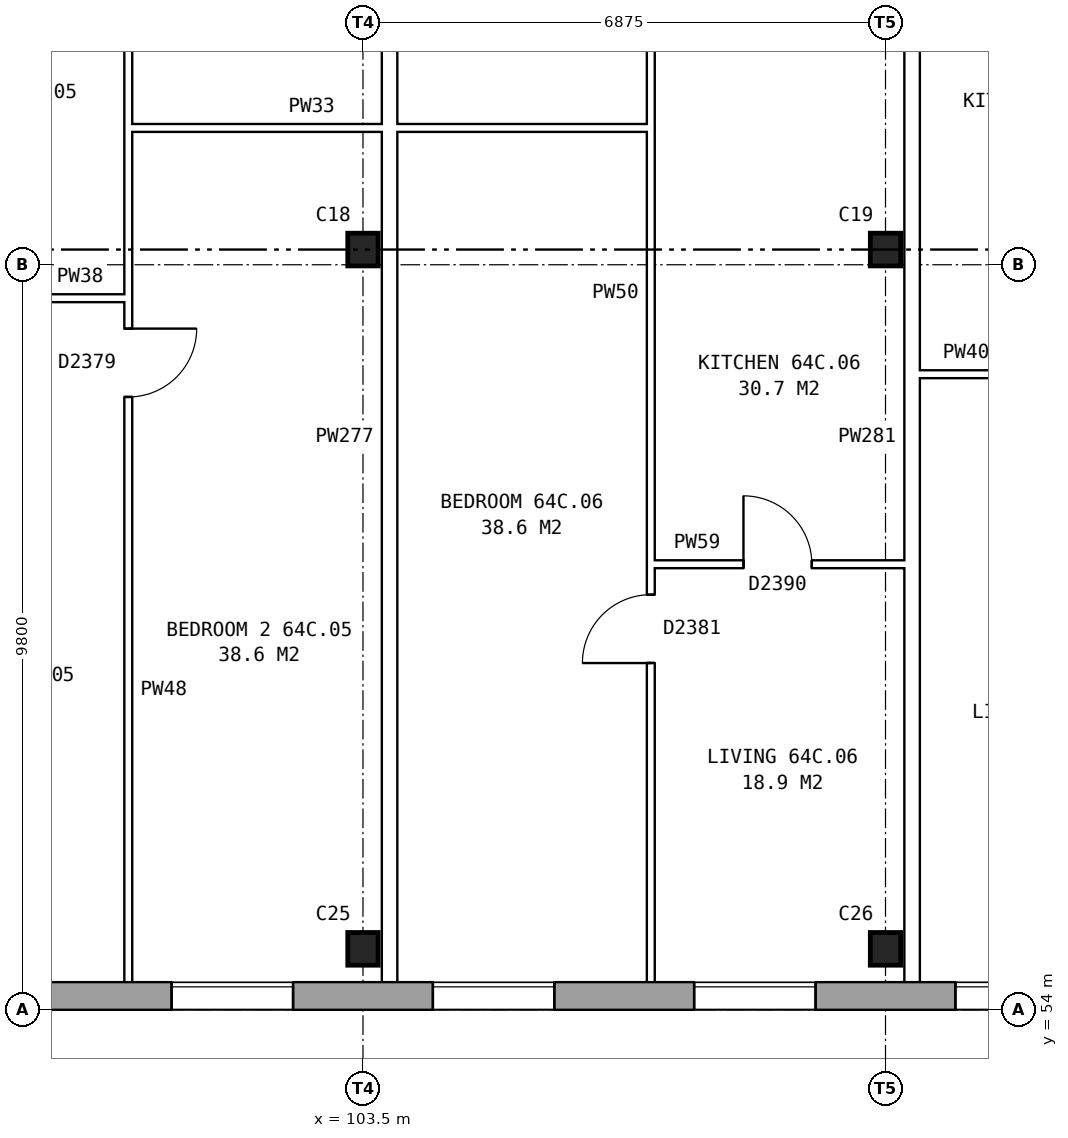
"""IFC4 building model, lengths in metres.
Left out: names, types, materials, properties, quantities, classifications, styles, units other than length and angle.
Written with IfcOpenShell. Run it as: python <this file> out.ifc"""

import sys

from ifc_helpers import new_model, si_unit, direction, frame, frame_2d, origin, origin_2d, place, context, subcontext, project, spatial, rectangle, i_section, extrude, element, fill, save


model = new_model("IFC4")
c1 = context("Model", 3, precision=1e-05, world=origin(), true_north=direction((0.0, 1.0)))
c2 = subcontext(c1, "Body", "Model", "MODEL_VIEW")
j1 = project(units=[si_unit("LENGTHUNIT", "METRE"), si_unit("PLANEANGLEUNIT", "RADIAN")], contexts=[c1])
p1 = place(None, origin())
s1 = spatial("IfcSite", under=j1, at=p1, CompositionType="ELEMENT")
p2 = place(p1, origin())
s2 = spatial("IfcBuilding", under=s1, at=p2, CompositionType="ELEMENT")
p3 = place(p2, frame((0.0, 0.0, 227.6)))
s3 = spatial("IfcBuildingStorey", under=s2, at=p3, CompositionType="ELEMENT", Elevation=227.6)
for number, where, z_axis, x_axis in (
    (1, (103.5, 54.8, 0.0), (0.0, 0.0, 1.0), (1.0, 0.0, 0.0)),
    (2, (110.375, 54.8, 0.0), (0.0, 0.0, 1.0), (1.0, 0.0, 0.0)),
    (3, (103.5, 64.0, 0.0), (0.0, 0.0, 1.0), (1.0, 0.0, 0.0)),
    (4, (110.375, 64.0, 0.0), (0.0, 0.0, 1.0), (1.0, 0.0, 0.0)),
):
    element("IfcColumn", number, at=place(p3, frame(where, z_axis=z_axis, x_axis=x_axis)), inside=s3, PredefinedType="COLUMN", context=c2, shape_type="SweptSolid", body=[
        extrude(i_section(OverallWidth=0.4, OverallDepth=0.43, WebThickness=0.04, FlangeThickness=0.04, at=origin_2d()), origin(), (0.0, 0.0, 1.0), 2.85),
    ])
p4 = place(p3, frame((75.95, 54.18, 0.0), z_axis=(0.0, 0.0, 1.0), x_axis=(1.0, 0.0, 0.0)))
e5 = element("IfcWall", 5, at=p4, inside=s3, PredefinedType="STANDARD", context=c2, shape_type="SweptSolid", body=[
    extrude(rectangle(XDim=55.1, YDim=0.36, at=frame_2d((27.55, 0.0))), origin(), (0.0, 0.0, 1.0), 2.85),
])
p5 = place(p4, frame((0.969, 0.0, 0.8)))
e6 = element("IfcOpeningElement", 6, at=p5, cuts=e5, PredefinedType="OPENING", context=c2, shape_type="SweptSolid", body=[
    extrude(rectangle(XDim=1.6, YDim=1.8, at=frame_2d((0.8, 0.9))), frame((0.0, 0.19, 0.0), z_axis=(0.0, -1.0, 0.0), x_axis=(1.0, 0.0, 0.0)), (0.0, 0.0, 1.0), 0.38),
])
p6 = place(p4, frame((4.406, 0.0, 0.8)))
e7 = element("IfcOpeningElement", 7, at=p6, cuts=e5, PredefinedType="OPENING", context=c2, shape_type="SweptSolid", body=[
    extrude(rectangle(XDim=1.6, YDim=1.8, at=frame_2d((0.8, 0.9))), frame((0.0, 0.19, 0.0), z_axis=(0.0, -1.0, 0.0), x_axis=(1.0, 0.0, 0.0)), (0.0, 0.0, 1.0), 0.38),
])
p7 = place(p4, frame((7.844, 0.0, 0.8)))
e8 = element("IfcOpeningElement", 8, at=p7, cuts=e5, PredefinedType="OPENING", context=c2, shape_type="SweptSolid", body=[
    extrude(rectangle(XDim=1.6, YDim=1.8, at=frame_2d((0.8, 0.9))), frame((0.0, 0.19, 0.0), z_axis=(0.0, -1.0, 0.0), x_axis=(1.0, 0.0, 0.0)), (0.0, 0.0, 1.0), 0.38),
])
p8 = place(p4, frame((11.281, 0.0, 0.8)))
e9 = element("IfcOpeningElement", 9, at=p8, cuts=e5, PredefinedType="OPENING", context=c2, shape_type="SweptSolid", body=[
    extrude(rectangle(XDim=1.6, YDim=1.8, at=frame_2d((0.8, 0.9))), frame((0.0, 0.19, 0.0), z_axis=(0.0, -1.0, 0.0), x_axis=(1.0, 0.0, 0.0)), (0.0, 0.0, 1.0), 0.38),
])
p9 = place(p4, frame((14.719, 0.0, 0.8)))
e10 = element("IfcOpeningElement", 10, at=p9, cuts=e5, PredefinedType="OPENING", context=c2, shape_type="SweptSolid", body=[
    extrude(rectangle(XDim=1.6, YDim=1.8, at=frame_2d((0.8, 0.9))), frame((0.0, 0.19, 0.0), z_axis=(0.0, -1.0, 0.0), x_axis=(1.0, 0.0, 0.0)), (0.0, 0.0, 1.0), 0.38),
])
p10 = place(p4, frame((18.156, 0.0, 0.8)))
e11 = element("IfcOpeningElement", 11, at=p10, cuts=e5, PredefinedType="OPENING", context=c2, shape_type="SweptSolid", body=[
    extrude(rectangle(XDim=1.6, YDim=1.8, at=frame_2d((0.8, 0.9))), frame((0.0, 0.19, 0.0), z_axis=(0.0, -1.0, 0.0), x_axis=(1.0, 0.0, 0.0)), (0.0, 0.0, 1.0), 0.38),
])
p11 = place(p4, frame((21.594, 0.0, 0.8)))
e12 = element("IfcOpeningElement", 12, at=p11, cuts=e5, PredefinedType="OPENING", context=c2, shape_type="SweptSolid", body=[
    extrude(rectangle(XDim=1.6, YDim=1.8, at=frame_2d((0.8, 0.9))), frame((0.0, 0.19, 0.0), z_axis=(0.0, -1.0, 0.0), x_axis=(1.0, 0.0, 0.0)), (0.0, 0.0, 1.0), 0.38),
])
p12 = place(p4, frame((25.031, 0.0, 0.8)))
e13 = element("IfcOpeningElement", 13, at=p12, cuts=e5, PredefinedType="OPENING", context=c2, shape_type="SweptSolid", body=[
    extrude(rectangle(XDim=1.6, YDim=1.8, at=frame_2d((0.8, 0.9))), frame((0.0, 0.19, 0.0), z_axis=(0.0, -1.0, 0.0), x_axis=(1.0, 0.0, 0.0)), (0.0, 0.0, 1.0), 0.38),
])
p13 = place(p4, frame((28.469, 0.0, 0.8)))
e14 = element("IfcOpeningElement", 14, at=p13, cuts=e5, PredefinedType="OPENING", context=c2, shape_type="SweptSolid", body=[
    extrude(rectangle(XDim=1.6, YDim=1.8, at=frame_2d((0.8, 0.9))), frame((0.0, 0.19, 0.0), z_axis=(0.0, -1.0, 0.0), x_axis=(1.0, 0.0, 0.0)), (0.0, 0.0, 1.0), 0.38),
])
p14 = place(p4, frame((31.906, 0.0, 0.8)))
e15 = element("IfcOpeningElement", 15, at=p14, cuts=e5, PredefinedType="OPENING", context=c2, shape_type="SweptSolid", body=[
    extrude(rectangle(XDim=1.6, YDim=1.8, at=frame_2d((0.8, 0.9))), frame((0.0, 0.19, 0.0), z_axis=(0.0, -1.0, 0.0), x_axis=(1.0, 0.0, 0.0)), (0.0, 0.0, 1.0), 0.38),
])
p15 = place(p4, frame((35.344, 0.0, 0.8)))
e16 = element("IfcOpeningElement", 16, at=p15, cuts=e5, PredefinedType="OPENING", context=c2, shape_type="SweptSolid", body=[
    extrude(rectangle(XDim=1.6, YDim=1.8, at=frame_2d((0.8, 0.9))), frame((0.0, 0.19, 0.0), z_axis=(0.0, -1.0, 0.0), x_axis=(1.0, 0.0, 0.0)), (0.0, 0.0, 1.0), 0.38),
])
p16 = place(p4, frame((38.781, 0.0, 0.8)))
e17 = element("IfcOpeningElement", 17, at=p16, cuts=e5, PredefinedType="OPENING", context=c2, shape_type="SweptSolid", body=[
    extrude(rectangle(XDim=1.6, YDim=1.8, at=frame_2d((0.8, 0.9))), frame((0.0, 0.19, 0.0), z_axis=(0.0, -1.0, 0.0), x_axis=(1.0, 0.0, 0.0)), (0.0, 0.0, 1.0), 0.38),
])
p17 = place(p4, frame((42.219, 0.0, 0.8)))
e18 = element("IfcOpeningElement", 18, at=p17, cuts=e5, PredefinedType="OPENING", context=c2, shape_type="SweptSolid", body=[
    extrude(rectangle(XDim=1.6, YDim=1.8, at=frame_2d((0.8, 0.9))), frame((0.0, 0.19, 0.0), z_axis=(0.0, -1.0, 0.0), x_axis=(1.0, 0.0, 0.0)), (0.0, 0.0, 1.0), 0.38),
])
p18 = place(p4, frame((45.656, 0.0, 0.8)))
e19 = element("IfcOpeningElement", 19, at=p18, cuts=e5, PredefinedType="OPENING", context=c2, shape_type="SweptSolid", body=[
    extrude(rectangle(XDim=1.6, YDim=1.8, at=frame_2d((0.8, 0.9))), frame((0.0, 0.19, 0.0), z_axis=(0.0, -1.0, 0.0), x_axis=(1.0, 0.0, 0.0)), (0.0, 0.0, 1.0), 0.38),
])
p19 = place(p4, frame((49.094, 0.0, 0.8)))
e20 = element("IfcOpeningElement", 20, at=p19, cuts=e5, PredefinedType="OPENING", context=c2, shape_type="SweptSolid", body=[
    extrude(rectangle(XDim=1.6, YDim=1.8, at=frame_2d((0.8, 0.9))), frame((0.0, 0.19, 0.0), z_axis=(0.0, -1.0, 0.0), x_axis=(1.0, 0.0, 0.0)), (0.0, 0.0, 1.0), 0.38),
])
p20 = place(p4, frame((52.531, 0.0, 0.8)))
e21 = element("IfcOpeningElement", 21, at=p20, cuts=e5, PredefinedType="OPENING", context=c2, shape_type="SweptSolid", body=[
    extrude(rectangle(XDim=1.6, YDim=1.8, at=frame_2d((0.8, 0.9))), frame((0.0, 0.19, 0.0), z_axis=(0.0, -1.0, 0.0), x_axis=(1.0, 0.0, 0.0)), (0.0, 0.0, 1.0), 0.38),
])
p21 = place(p3, frame((107.287, 59.86, 0.0), z_axis=(0.0, 0.0, 1.0), x_axis=(1.0, 0.0, 0.0)))
e22 = element("IfcWall", 22, at=p21, inside=s3, PredefinedType="PARTITIONING", context=c2, shape_type="SweptSolid", body=[
    extrude(rectangle(XDim=3.338, YDim=0.1, at=frame_2d((1.669, 0.0))), origin(), (0.0, 0.0, 1.0), 2.85),
])
p22 = place(p21, frame((1.219, 0.0, 0.0)))
e23 = element("IfcOpeningElement", 23, at=p22, cuts=e22, PredefinedType="OPENING", context=c2, shape_type="SweptSolid", body=[
    extrude(rectangle(XDim=0.9, YDim=2.1, at=frame_2d((0.45, 1.05))), frame((0.0, 0.06, 0.0), z_axis=(0.0, -1.0, 0.0), x_axis=(1.0, 0.0, 0.0)), (0.0, 0.0, 1.0), 0.12),
])
p23 = place(p3, frame((110.825, 62.36, 0.0), z_axis=(0.0, 0.0, 1.0), x_axis=(1.0, 0.0, 0.0)))
e24 = element("IfcWall", 24, at=p23, inside=s3, PredefinedType="PARTITIONING", context=c2, shape_type="SweptSolid", body=[
    extrude(rectangle(XDim=3.337, YDim=0.1, at=frame_2d((1.668, 0.0))), origin(), (0.0, 0.0, 1.0), 2.85),
])
p24 = place(p23, frame((1.219, 0.0, 0.0)))
e25 = element("IfcOpeningElement", 25, at=p24, cuts=e24, PredefinedType="OPENING", context=c2, shape_type="SweptSolid", body=[
    extrude(rectangle(XDim=0.9, YDim=2.1, at=frame_2d((0.45, 1.05))), frame((0.0, 0.06, 0.0), z_axis=(0.0, -1.0, 0.0), x_axis=(1.0, 0.0, 0.0)), (0.0, 0.0, 1.0), 0.12),
])
p25 = place(p3, frame((96.975, 63.36, 0.0), z_axis=(0.0, 0.0, 1.0), x_axis=(1.0, 0.0, 0.0)))
e26 = element("IfcWall", 26, at=p25, inside=s3, PredefinedType="PARTITIONING", context=c2, shape_type="SweptSolid", body=[
    extrude(rectangle(XDim=3.437, YDim=0.1, at=frame_2d((1.719, 0.0))), origin(), (0.0, 0.0, 1.0), 2.85),
])
p26 = place(p25, frame((1.269, 0.0, 0.0)))
e27 = element("IfcOpeningElement", 27, at=p26, cuts=e26, PredefinedType="OPENING", context=c2, shape_type="SweptSolid", body=[
    extrude(rectangle(XDim=0.9, YDim=2.1, at=frame_2d((0.45, 1.05))), frame((0.0, 0.06, 0.0), z_axis=(0.0, -1.0, 0.0), x_axis=(1.0, 0.0, 0.0)), (0.0, 0.0, 1.0), 0.12),
])
p27 = place(p3, frame((100.412, 65.6, 0.0), z_axis=(0.0, 0.0, 1.0), x_axis=(1.0, 0.0, 0.0)))
e28 = element("IfcWall", 28, at=p27, inside=s3, PredefinedType="PARTITIONING", context=c2, shape_type="SweptSolid", body=[
    extrude(rectangle(XDim=6.875, YDim=0.1, at=frame_2d((3.438, 0.0))), origin(), (0.0, 0.0, 1.0), 2.85),
])
p28 = place(p3, frame((100.412, 54.36, 0.0), z_axis=(0.0, 0.0, 1.0), x_axis=(0.0, 1.0, 0.0)))
e29 = element("IfcWall", 29, at=p28, inside=s3, PredefinedType="PARTITIONING", context=c2, shape_type="SweptSolid", body=[
    extrude(rectangle(XDim=14.34, YDim=0.1, at=frame_2d((7.17, 0.0))), origin(), (0.0, 0.0, 1.0), 2.85),
])
p29 = place(p28, frame((7.7, 0.0, 0.0)))
e30 = element("IfcOpeningElement", 30, at=p29, cuts=e29, PredefinedType="OPENING", context=c2, shape_type="SweptSolid", body=[
    extrude(rectangle(XDim=0.9, YDim=2.1, at=frame_2d((0.45, 1.05))), frame((0.0, 0.06, 0.0), z_axis=(0.0, -1.0, 0.0), x_axis=(1.0, 0.0, 0.0)), (0.0, 0.0, 1.0), 0.12),
])
p30 = place(p28, frame((13.04, 0.0, 0.0)))
e31 = element("IfcOpeningElement", 31, at=p30, cuts=e29, PredefinedType="OPENING", context=c2, shape_type="SweptSolid", body=[
    extrude(rectangle(XDim=0.9, YDim=2.1, at=frame_2d((0.45, 1.05))), frame((0.0, 0.06, 0.0), z_axis=(0.0, -1.0, 0.0), x_axis=(1.0, 0.0, 0.0)), (0.0, 0.0, 1.0), 0.12),
])
p31 = place(p3, frame((103.85, 54.36, 0.0), z_axis=(0.0, 0.0, 1.0), x_axis=(0.0, 1.0, 0.0)))
e32 = element("IfcWall", 32, at=p31, inside=s3, PredefinedType="PARTITIONING", context=c2, shape_type="SweptSolid", body=[
    extrude(rectangle(XDim=14.34, YDim=0.2, at=frame_2d((7.17, 0.0))), origin(), (0.0, 0.0, 1.0), 2.85),
])
p32 = place(p3, frame((107.287, 54.36, 0.0), z_axis=(0.0, 0.0, 1.0), x_axis=(0.0, 1.0, 0.0)))
e33 = element("IfcWall", 33, at=p32, inside=s3, PredefinedType="PARTITIONING", context=c2, shape_type="SweptSolid", body=[
    extrude(rectangle(XDim=14.34, YDim=0.1, at=frame_2d((7.17, 0.0))), origin(), (0.0, 0.0, 1.0), 2.85),
])
p33 = place(p32, frame((4.2, 0.0, 0.0)))
e34 = element("IfcOpeningElement", 34, at=p33, cuts=e33, PredefinedType="OPENING", context=c2, shape_type="SweptSolid", body=[
    extrude(rectangle(XDim=0.9, YDim=2.1, at=frame_2d((0.45, 1.05))), frame((0.0, 0.06, 0.0), z_axis=(0.0, -1.0, 0.0), x_axis=(1.0, 0.0, 0.0)), (0.0, 0.0, 1.0), 0.12),
])
p34 = place(p32, frame((13.04, 0.0, 0.0)))
e35 = element("IfcOpeningElement", 35, at=p34, cuts=e33, PredefinedType="OPENING", context=c2, shape_type="SweptSolid", body=[
    extrude(rectangle(XDim=0.9, YDim=2.1, at=frame_2d((0.45, 1.05))), frame((0.0, 0.06, 0.0), z_axis=(0.0, -1.0, 0.0), x_axis=(1.0, 0.0, 0.0)), (0.0, 0.0, 1.0), 0.12),
])
p35 = place(p3, frame((110.725, 54.36, 0.0), z_axis=(0.0, 0.0, 1.0), x_axis=(0.0, 1.0, 0.0)))
e36 = element("IfcWall", 36, at=p35, inside=s3, PredefinedType="PARTITIONING", context=c2, shape_type="SweptSolid", body=[
    extrude(rectangle(XDim=14.34, YDim=0.2, at=frame_2d((7.17, 0.0))), origin(), (0.0, 0.0, 1.0), 2.85),
])
p36 = place(p12, origin())
e37 = element("IfcWindow", 37, at=p36, inside=s3, PartitioningType="SINGLE_PANEL", PredefinedType="WINDOW", context=c2, shape_type="SweptSolid", body=[
    extrude(rectangle(XDim=1.6, YDim=1.8, at=frame_2d((0.8, 0.9))), frame((0.0, 0.15, 0.0), z_axis=(0.0, -1.0, 0.0), x_axis=(1.0, 0.0, 0.0)), (0.0, 0.0, 1.0), 0.06),
])
fill(e13, e37)
p37 = place(p13, origin())
e38 = element("IfcWindow", 38, at=p37, inside=s3, PartitioningType="SINGLE_PANEL", PredefinedType="WINDOW", context=c2, shape_type="SweptSolid", body=[
    extrude(rectangle(XDim=1.6, YDim=1.8, at=frame_2d((0.8, 0.9))), frame((0.0, 0.15, 0.0), z_axis=(0.0, -1.0, 0.0), x_axis=(1.0, 0.0, 0.0)), (0.0, 0.0, 1.0), 0.06),
])
fill(e14, e38)
p38 = place(p14, origin())
e39 = element("IfcWindow", 39, at=p38, inside=s3, PartitioningType="SINGLE_PANEL", PredefinedType="WINDOW", context=c2, shape_type="SweptSolid", body=[
    extrude(rectangle(XDim=1.6, YDim=1.8, at=frame_2d((0.8, 0.9))), frame((0.0, 0.15, 0.0), z_axis=(0.0, -1.0, 0.0), x_axis=(1.0, 0.0, 0.0)), (0.0, 0.0, 1.0), 0.06),
])
fill(e15, e39)
p39 = place(p15, origin())
e40 = element("IfcWindow", 40, at=p39, inside=s3, PartitioningType="SINGLE_PANEL", PredefinedType="WINDOW", context=c2, shape_type="SweptSolid", body=[
    extrude(rectangle(XDim=1.6, YDim=1.8, at=frame_2d((0.8, 0.9))), frame((0.0, 0.15, 0.0), z_axis=(0.0, -1.0, 0.0), x_axis=(1.0, 0.0, 0.0)), (0.0, 0.0, 1.0), 0.06),
])
fill(e16, e40)
p40 = place(p29, frame((0.9, 0.0, 0.0), z_axis=(0.0, 0.0, 1.0), x_axis=(-1.0, 0.0, 0.0)))
e41 = element("IfcDoor", 41, at=p40, inside=s3, OperationType="SINGLE_SWING_LEFT", PredefinedType="DOOR", context=c2, shape_type="SweptSolid", body=[
    extrude(rectangle(XDim=0.9, YDim=2.1, at=frame_2d((0.45, 1.05))), frame((0.0, 0.025, 0.0), z_axis=(0.0, -1.0, 0.0), x_axis=(1.0, 0.0, 0.0)), (0.0, 0.0, 1.0), 0.05),
])
fill(e30, e41)
p41 = place(p33, origin())
e42 = element("IfcDoor", 42, at=p41, inside=s3, OperationType="SINGLE_SWING_LEFT", PredefinedType="DOOR", context=c2, shape_type="SweptSolid", body=[
    extrude(rectangle(XDim=0.9, YDim=2.1, at=frame_2d((0.45, 1.05))), frame((0.0, 0.025, 0.0), z_axis=(0.0, -1.0, 0.0), x_axis=(1.0, 0.0, 0.0)), (0.0, 0.0, 1.0), 0.05),
])
fill(e34, e42)
p42 = place(p22, origin())
e43 = element("IfcDoor", 43, at=p42, inside=s3, OperationType="SINGLE_SWING_LEFT", PredefinedType="DOOR", context=c2, shape_type="SweptSolid", body=[
    extrude(rectangle(XDim=0.9, YDim=2.1, at=frame_2d((0.45, 1.05))), frame((0.0, 0.025, 0.0), z_axis=(0.0, -1.0, 0.0), x_axis=(1.0, 0.0, 0.0)), (0.0, 0.0, 1.0), 0.05),
])
fill(e23, e43)
save(model, sys.argv[1])
